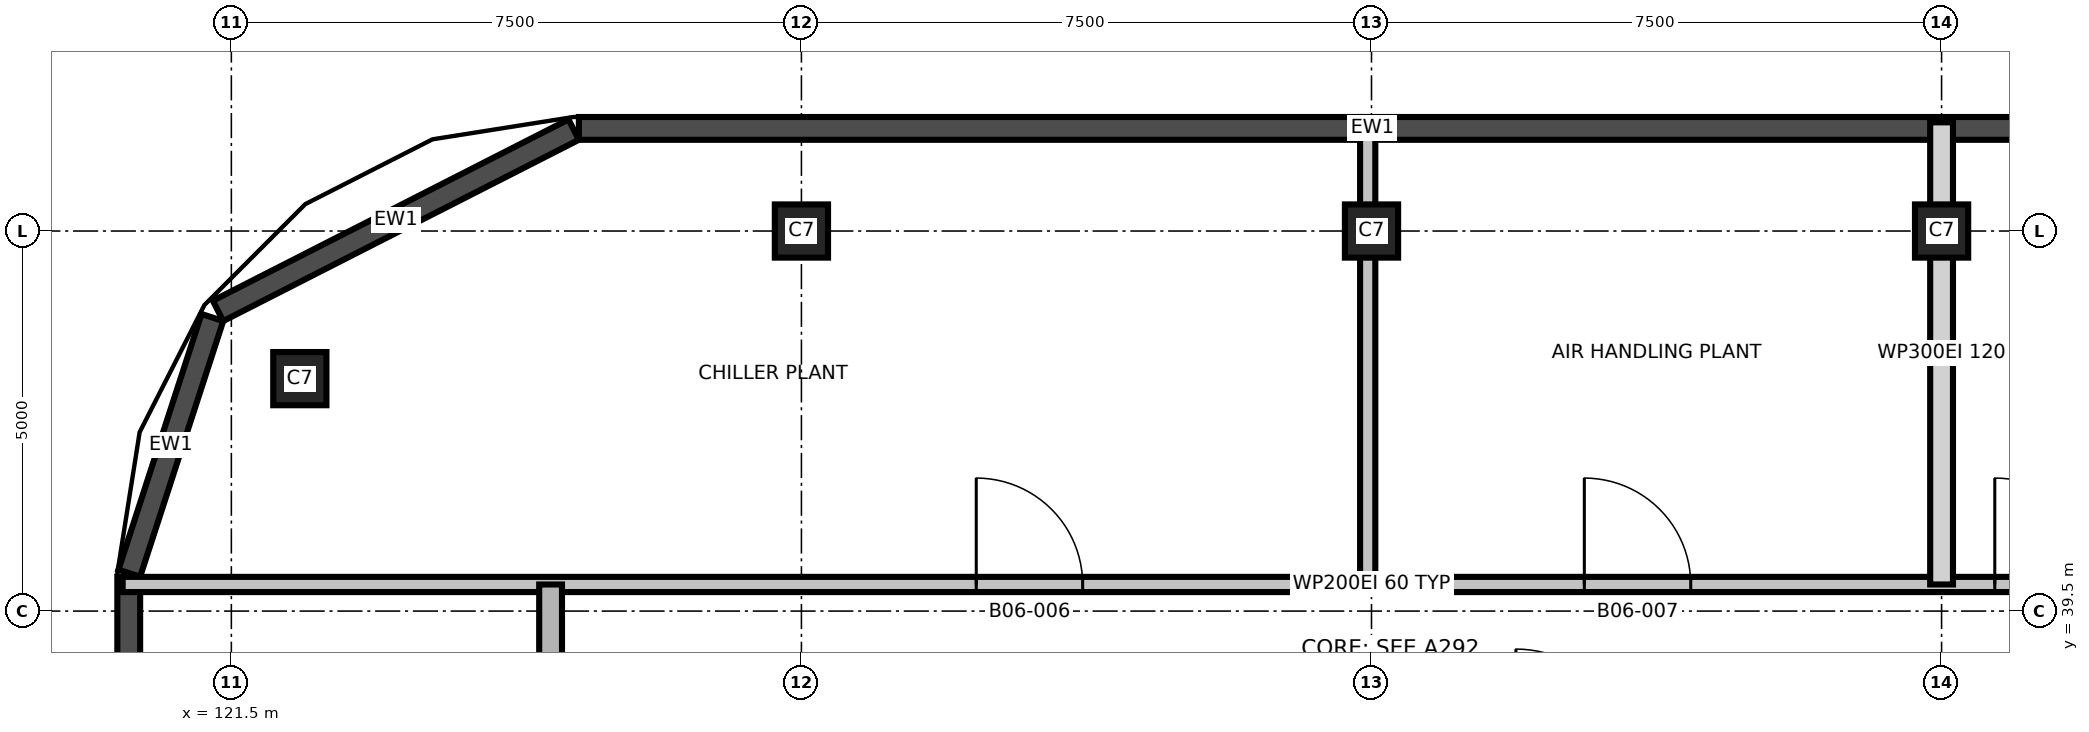
"""IFC4 building model, lengths in metres.
Left out: names, types, materials, properties, quantities, classifications, styles, units other than length and angle.
Written with IfcOpenShell. Run it as: python <this file> out.ifc"""

import sys

from ifc_helpers import new_model, si_unit, direction, frame, frame_2d, origin, origin_2d, place, context, subcontext, project, spatial, rectangle, extrude, element, fill, save


model = new_model("IFC4")
c1 = context("Model", 3, precision=1e-05, world=origin(), true_north=direction((0.0, 1.0)))
c2 = subcontext(c1, "Body", "Model", "MODEL_VIEW")
j1 = project(units=[si_unit("LENGTHUNIT", "METRE"), si_unit("PLANEANGLEUNIT", "RADIAN")], contexts=[c1])
p1 = place(None, origin())
s1 = spatial("IfcSite", under=j1, at=p1, CompositionType="ELEMENT")
p2 = place(p1, origin())
s2 = spatial("IfcBuilding", under=s1, at=p2, CompositionType="ELEMENT")
p3 = place(p2, frame((0.0, 0.0, 81.6)))
s3 = spatial("IfcBuildingStorey", under=s2, at=p3, CompositionType="ELEMENT", Elevation=81.6)
for number, where, z_axis, x_axis in (
    (1, (122.401, 42.558, 0.0), (0.0, 0.0, 1.0), (1.0, 0.0, 0.0)),
    (2, (129.0, 44.5, 0.0), (0.0, 0.0, 1.0), (1.0, 0.0, 0.0)),
    (3, (136.5, 44.5, 0.0), (0.0, 0.0, 1.0), (1.0, 0.0, 0.0)),
    (4, (144.0, 44.5, 0.0), (0.0, 0.0, 1.0), (1.0, 0.0, 0.0)),
):
    element("IfcColumn", number, at=place(p3, frame(where, z_axis=z_axis, x_axis=x_axis)), inside=s3, PredefinedType="COLUMN", context=c2, shape_type="SweptSolid", body=[
        extrude(rectangle(XDim=0.7, YDim=0.7, at=origin_2d()), origin(), (0.0, 0.0, 1.0), 5.5),
    ])
p4 = place(p3, frame((146.952, 45.85, 0.0), z_axis=(0.0, 0.0, 1.0), x_axis=(-1.0, 0.0, 0.0)))
e5 = element("IfcWall", 5, at=p4, inside=s3, PredefinedType="SOLIDWALL", context=c2, shape_type="SweptSolid", body=[
    extrude(rectangle(XDim=20.88, YDim=0.3, at=frame_2d((10.44, 0.0))), origin(), (0.0, 0.0, 1.0), 5.2),
])
p5 = place(p3, frame((126.004, 45.834, 0.0), z_axis=(0.0, 0.0, 1.0), x_axis=(-0.890998339455, -0.454006562826, 0.0)))
e6 = element("IfcWall", 6, at=p5, inside=s3, PredefinedType="SOLIDWALL", context=c2, shape_type="SweptSolid", body=[
    extrude(rectangle(XDim=5.252, YDim=0.3, at=frame_2d((2.626, 0.0))), origin(), (0.0, 0.0, 1.0), 5.2),
])
p6 = place(p3, frame((121.25, 43.362, 0.0), z_axis=(0.0, 0.0, 1.0), x_axis=(-0.309073584194, -0.951038127287, 0.0)))
e7 = element("IfcWall", 7, at=p6, inside=s3, PredefinedType="SOLIDWALL", context=c2, shape_type="SweptSolid", body=[
    extrude(rectangle(XDim=3.536, YDim=0.3, at=frame_2d((1.768, 0.0))), origin(), (0.0, 0.0, 1.0), 5.2),
])
p7 = place(p3, frame((120.15, 39.952, 0.0), z_axis=(0.0, 0.0, 1.0), x_axis=(0.0, -1.0, 0.0)))
e8 = element("IfcWall", 8, at=p7, inside=s3, PredefinedType="SOLIDWALL", context=c2, shape_type="SweptSolid", body=[
    extrude(rectangle(XDim=17.88, YDim=0.3, at=frame_2d((8.94, 0.0))), origin(), (0.0, 0.0, 1.0), 5.2),
])
p8 = place(p3, frame((120.07, 39.85, 0.0), z_axis=(0.0, 0.0, 1.0), x_axis=(1.0, 0.0, 0.0)))
e9 = element("IfcWall", 9, at=p8, inside=s3, PredefinedType="PARTITIONING", context=c2, shape_type="SweptSolid", body=[
    extrude(rectangle(XDim=32.86, YDim=0.2, at=frame_2d((16.43, 0.0))), origin(), (0.0, 0.0, 1.0), 5.2),
])
p9 = place(p8, frame((11.23, 0.0, 0.0)))
e10 = element("IfcOpeningElement", 10, at=p9, cuts=e9, PredefinedType="OPENING", context=c2, shape_type="SweptSolid", body=[
    extrude(rectangle(XDim=1.4, YDim=2.1, at=frame_2d((0.7, 1.05))), frame((0.0, 0.11, 0.0), z_axis=(0.0, -1.0, 0.0), x_axis=(1.0, 0.0, 0.0)), (0.0, 0.0, 1.0), 0.22),
])
p10 = place(p8, frame((19.23, 0.0, 0.0)))
e11 = element("IfcOpeningElement", 11, at=p10, cuts=e9, PredefinedType="OPENING", context=c2, shape_type="SweptSolid", body=[
    extrude(rectangle(XDim=1.4, YDim=2.1, at=frame_2d((0.7, 1.05))), frame((0.0, 0.11, 0.0), z_axis=(0.0, -1.0, 0.0), x_axis=(1.0, 0.0, 0.0)), (0.0, 0.0, 1.0), 0.22),
])
p11 = place(p8, frame((24.63, 0.0, 0.0)))
e12 = element("IfcOpeningElement", 12, at=p11, cuts=e9, PredefinedType="OPENING", context=c2, shape_type="SweptSolid", body=[
    extrude(rectangle(XDim=1.4, YDim=2.1, at=frame_2d((0.7, 1.05))), frame((0.0, 0.11, 0.0), z_axis=(0.0, -1.0, 0.0), x_axis=(1.0, 0.0, 0.0)), (0.0, 0.0, 1.0), 0.22),
])
p12 = place(p3, frame((125.7, 22.15, 0.0), z_axis=(0.0, 0.0, 1.0), x_axis=(0.0, 1.0, 0.0)))
e13 = element("IfcWall", 13, at=p12, inside=s3, PredefinedType="SHEAR", context=c2, shape_type="SweptSolid", body=[
    extrude(rectangle(XDim=17.7, YDim=0.3, at=frame_2d((8.85, 0.0))), origin(), (0.0, 0.0, 1.0), 5.2),
])
p13 = place(p12, frame((7.45, 0.0, 0.0)))
e14 = element("IfcOpeningElement", 14, at=p13, cuts=e13, PredefinedType="OPENING", context=c2, shape_type="SweptSolid", body=[
    extrude(rectangle(XDim=1.2, YDim=2.1, at=frame_2d((0.6, 1.05))), frame((0.0, 0.16, 0.0), z_axis=(0.0, -1.0, 0.0), x_axis=(1.0, 0.0, 0.0)), (0.0, 0.0, 1.0), 0.32),
])
p14 = place(p12, frame((3.25, 0.0, 0.0)))
e15 = element("IfcOpeningElement", 15, at=p14, cuts=e13, PredefinedType="OPENING", context=c2, shape_type="SweptSolid", body=[
    extrude(rectangle(XDim=1.2, YDim=2.1, at=frame_2d((0.6, 1.05))), frame((0.0, 0.16, 0.0), z_axis=(0.0, -1.0, 0.0), x_axis=(1.0, 0.0, 0.0)), (0.0, 0.0, 1.0), 0.32),
])
p15 = place(p3, frame((136.45, 39.85, 0.0), z_axis=(0.0, 0.0, 1.0), x_axis=(0.0, 1.0, 0.0)))
e16 = element("IfcWall", 16, at=p15, inside=s3, PredefinedType="PARTITIONING", context=c2, shape_type="SweptSolid", body=[
    extrude(rectangle(XDim=6.08, YDim=0.2, at=frame_2d((3.04, 0.0))), origin(), (0.0, 0.0, 1.0), 5.2),
])
p16 = place(p3, frame((144.0, 39.85, 0.0), z_axis=(0.0, 0.0, 1.0), x_axis=(0.0, 1.0, 0.0)))
e17 = element("IfcWall", 17, at=p16, inside=s3, PredefinedType="PARTITIONING", context=c2, shape_type="SweptSolid", body=[
    extrude(rectangle(XDim=6.08, YDim=0.3, at=frame_2d((3.04, 0.0))), origin(), (0.0, 0.0, 1.0), 5.2),
])
p17 = place(p9, origin())
e18 = element("IfcDoor", 18, at=p17, inside=s3, OperationType="SINGLE_SWING_RIGHT", PredefinedType="DOOR", context=c2, shape_type="SweptSolid", body=[
    extrude(rectangle(XDim=1.4, YDim=2.1, at=frame_2d((0.7, 1.05))), frame((0.0, 0.025, 0.0), z_axis=(0.0, -1.0, 0.0), x_axis=(1.0, 0.0, 0.0)), (0.0, 0.0, 1.0), 0.05),
])
fill(e10, e18)
p18 = place(p10, origin())
e19 = element("IfcDoor", 19, at=p18, inside=s3, OperationType="SINGLE_SWING_LEFT", PredefinedType="DOOR", context=c2, shape_type="SweptSolid", body=[
    extrude(rectangle(XDim=1.4, YDim=2.1, at=frame_2d((0.7, 1.05))), frame((0.0, 0.025, 0.0), z_axis=(0.0, -1.0, 0.0), x_axis=(1.0, 0.0, 0.0)), (0.0, 0.0, 1.0), 0.05),
])
fill(e11, e19)
p19 = place(p11, origin())
e20 = element("IfcDoor", 20, at=p19, inside=s3, OperationType="SINGLE_SWING_RIGHT", PredefinedType="DOOR", context=c2, shape_type="SweptSolid", body=[
    extrude(rectangle(XDim=1.4, YDim=2.1, at=frame_2d((0.7, 1.05))), frame((0.0, 0.025, 0.0), z_axis=(0.0, -1.0, 0.0), x_axis=(1.0, 0.0, 0.0)), (0.0, 0.0, 1.0), 0.05),
])
fill(e12, e20)
save(model, sys.argv[1])
